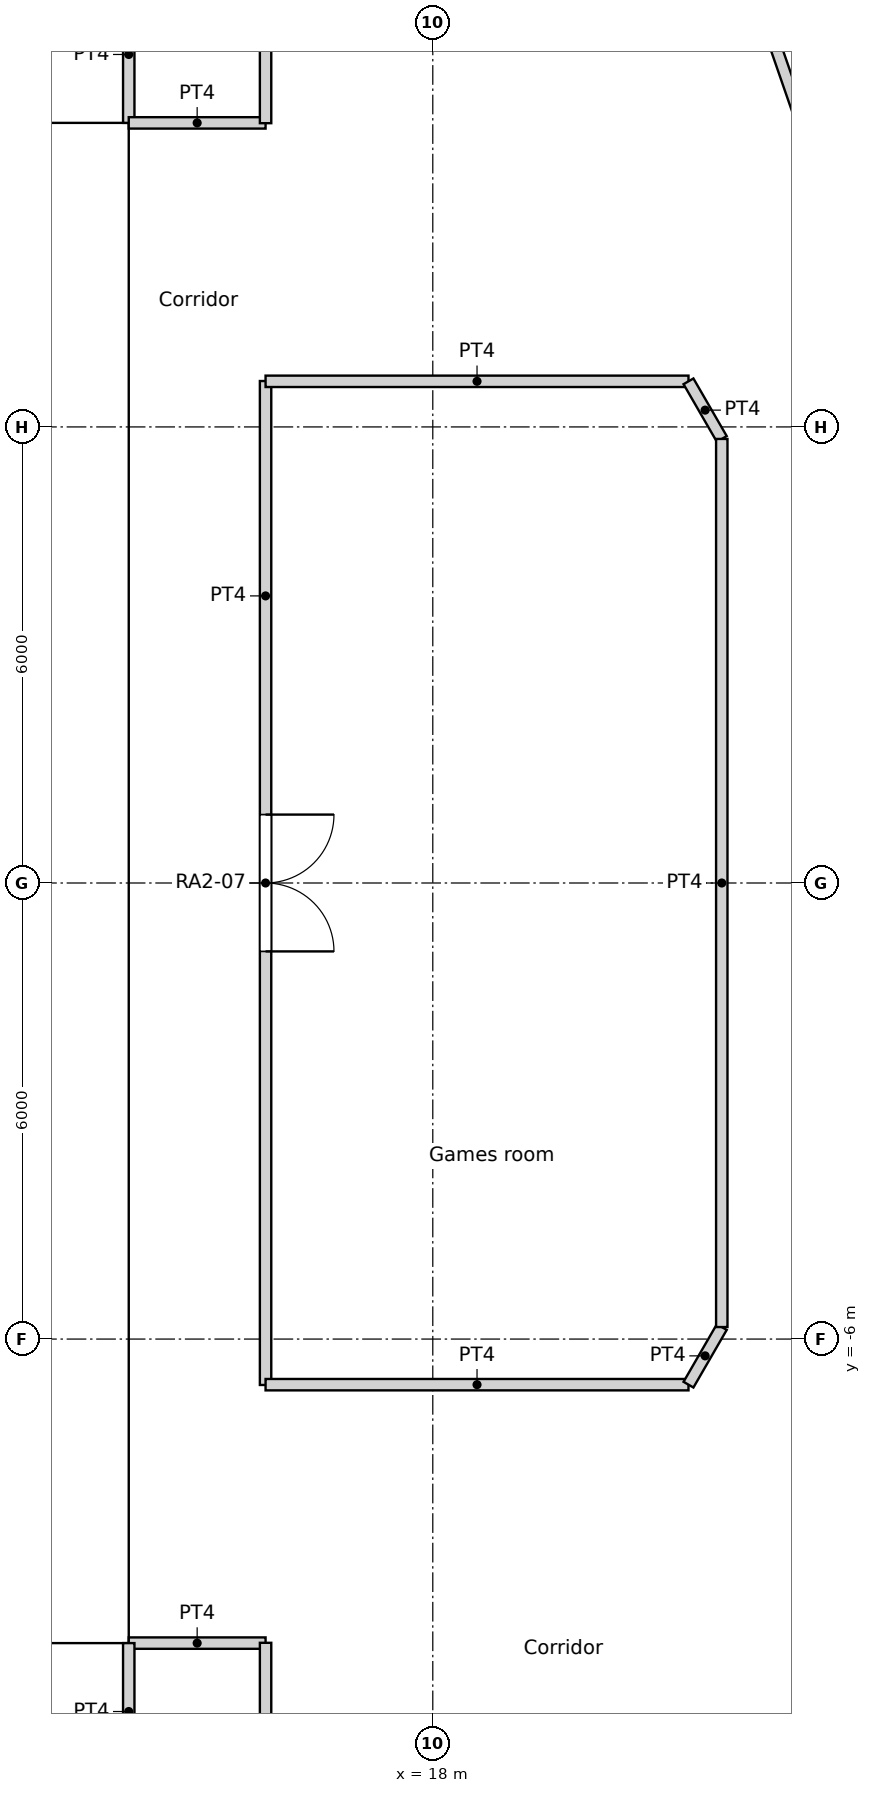
"""IFC4 building model, lengths in metres.
Left out: names, types, materials, properties, quantities, classifications, styles, units other than length and angle.
Written with IfcOpenShell. Run it as: python <this file> out.ifc"""

import sys

from ifc_helpers import new_model, si_unit, direction, frame, frame_2d, origin, origin_2d, place, context, subcontext, project, spatial, rectangle, circle, extrude, element, fill, save


model = new_model("IFC4")
c1 = context("Model", 3, precision=1e-05, world=origin(), true_north=direction((0.0, 1.0)))
c2 = subcontext(c1, "Body", "Model", "MODEL_VIEW")
j1 = project(units=[si_unit("LENGTHUNIT", "METRE"), si_unit("PLANEANGLEUNIT", "RADIAN")], contexts=[c1])
p1 = place(None, origin())
s1 = spatial("IfcSite", under=j1, at=p1, CompositionType="ELEMENT")
p2 = place(p1, origin())
s2 = spatial("IfcBuilding", under=s1, at=p2, CompositionType="ELEMENT")
p3 = place(p2, frame((0.0, 0.0, 39.0)))
s3 = spatial("IfcBuildingStorey", under=s2, at=p3, CompositionType="ELEMENT", Elevation=39.0)
for number, where, z_axis, x_axis in (
    (1, (21.937, 11.017, 0.0), (0.0, 0.0, 1.0), (1.0, 0.0, 0.0)),
    (2, (21.937, -11.017, 0.0), (0.0, 0.0, 1.0), (1.0, 0.0, 0.0)),
):
    element("IfcColumn", number, at=place(p3, frame(where, z_axis=z_axis, x_axis=x_axis)), inside=s3, PredefinedType="COLUMN", context=c2, shape_type="SweptSolid", body=[
        extrude(circle(Radius=0.75, at=origin_2d()), origin(), (0.0, 0.0, 1.0), 3.6),
    ])
for number, where, z_axis, x_axis in (
    (3, (18.822, 0.0, 0.0), (0.0, 0.0, 1.0), (1.0, 0.0, 0.0)),
    (4, (17.986, 5.548, 0.0), (0.0, 0.0, 1.0), (1.0, 0.0, 0.0)),
    (5, (15.552, 10.603, 0.0), (0.0, 0.0, 1.0), (1.0, 0.0, 0.0)),
    (6, (15.552, -10.603, 0.0), (0.0, 0.0, 1.0), (1.0, 0.0, 0.0)),
    (7, (17.986, -5.548, 0.0), (0.0, 0.0, 1.0), (1.0, 0.0, 0.0)),
):
    element("IfcColumn", number, at=place(p3, frame(where, z_axis=z_axis, x_axis=x_axis)), inside=s3, PredefinedType="COLUMN", context=c2, shape_type="SweptSolid", body=[
        extrude(circle(Radius=0.8, at=origin_2d()), origin(), (0.0, 0.0, 1.0), 3.6),
    ])
p4 = place(p3, frame((-14.0, -9.4, 0.0), z_axis=(0.0, 0.0, 1.0), x_axis=(1.0, 0.0, 0.0)))
e8 = element("IfcWall", 8, at=p4, inside=s3, PredefinedType="SOLIDWALL", context=c2, shape_type="SweptSolid", body=[
    extrude(rectangle(XDim=28.0, YDim=1.2, at=frame_2d((14.0, 0.0))), origin(), (0.0, 0.0, 1.0), 3.6),
])
p5 = place(p4, frame((14.9, 0.0, 0.0)))
e9 = element("IfcOpeningElement", 9, at=p5, cuts=e8, PredefinedType="OPENING", context=c2, shape_type="SweptSolid", body=[
    extrude(rectangle(XDim=1.0, YDim=2.1, at=frame_2d((0.5, 1.05))), frame((0.0, 0.6, 0.0), z_axis=(0.0, -1.0, 0.0), x_axis=(1.0, 0.0, 0.0)), (0.0, 0.0, 1.0), 1.2),
])
p6 = place(p4, frame((9.8, 0.0, 0.0)))
e10 = element("IfcOpeningElement", 10, at=p6, cuts=e8, PredefinedType="OPENING", context=c2, shape_type="SweptSolid", body=[
    extrude(rectangle(XDim=1.8, YDim=2.1, at=frame_2d((0.9, 1.05))), frame((0.0, 0.6, 0.0), z_axis=(0.0, -1.0, 0.0), x_axis=(1.0, 0.0, 0.0)), (0.0, 0.0, 1.0), 1.2),
])
p7 = place(p4, frame((16.4, 0.0, 0.0)))
e11 = element("IfcOpeningElement", 11, at=p7, cuts=e8, PredefinedType="OPENING", context=c2, shape_type="SweptSolid", body=[
    extrude(rectangle(XDim=1.8, YDim=2.1, at=frame_2d((0.9, 1.05))), frame((0.0, 0.6, 0.0), z_axis=(0.0, -1.0, 0.0), x_axis=(1.0, 0.0, 0.0)), (0.0, 0.0, 1.0), 1.2),
])
p8 = place(p3, frame((-14.0, 9.4, 0.0), z_axis=(0.0, 0.0, 1.0), x_axis=(1.0, 0.0, 0.0)))
e12 = element("IfcWall", 12, at=p8, inside=s3, PredefinedType="SOLIDWALL", context=c2, shape_type="SweptSolid", body=[
    extrude(rectangle(XDim=28.0, YDim=1.2, at=frame_2d((14.0, 0.0))), origin(), (0.0, 0.0, 1.0), 3.6),
])
p9 = place(p8, frame((9.8, 0.0, 0.0)))
e13 = element("IfcOpeningElement", 13, at=p9, cuts=e12, PredefinedType="OPENING", context=c2, shape_type="SweptSolid", body=[
    extrude(rectangle(XDim=1.8, YDim=2.1, at=frame_2d((0.9, 1.05))), frame((0.0, 0.6, 0.0), z_axis=(0.0, -1.0, 0.0), x_axis=(1.0, 0.0, 0.0)), (0.0, 0.0, 1.0), 1.2),
])
p10 = place(p3, frame((13.4, -8.8, 0.0), z_axis=(0.0, 0.0, 1.0), x_axis=(0.0, 1.0, 0.0)))
e14 = element("IfcWall", 14, at=p10, inside=s3, PredefinedType="SOLIDWALL", context=c2, shape_type="SweptSolid", body=[
    extrude(rectangle(XDim=17.6, YDim=1.2, at=frame_2d((8.8, 0.0))), origin(), (0.0, 0.0, 1.0), 3.6),
])
p11 = place(p10, frame((6.3, 0.0, 0.0)))
e15 = element("IfcOpeningElement", 15, at=p11, cuts=e14, PredefinedType="OPENING", context=c2, shape_type="SweptSolid", body=[
    extrude(rectangle(XDim=1.0, YDim=2.1, at=frame_2d((0.5, 1.05))), frame((0.0, 0.6, 0.0), z_axis=(0.0, -1.0, 0.0), x_axis=(1.0, 0.0, 0.0)), (0.0, 0.0, 1.0), 1.2),
])
for number, where, z_axis, x_axis in (
    (16, (14.0, 10.0, 0.0), (0.0, 0.0, 1.0), (0.0, 1.0, 0.0)),
    (17, (14.0, -11.8, 0.0), (0.0, 0.0, 1.0), (0.0, 1.0, 0.0)),
    (18, (14.0, 10.0, 0.0), (0.0, 0.0, 1.0), (1.0, 0.0, 0.0)),
    (19, (14.0, -10.0, 0.0), (0.0, 0.0, 1.0), (1.0, 0.0, 0.0)),
):
    element("IfcWall", number, at=place(p3, frame(where, z_axis=z_axis, x_axis=x_axis)), inside=s3, PredefinedType="PARTITIONING", context=c2, shape_type="SweptSolid", body=[
        extrude(rectangle(XDim=1.8, YDim=0.15, at=frame_2d((0.9, 0.0))), origin(), (0.0, 0.0, 1.0), 3.15),
    ])
p12 = place(p3, frame((15.8, -6.604, 0.0), z_axis=(0.0, 0.0, 1.0), x_axis=(0.0, 1.0, 0.0)))
e20 = element("IfcWall", 20, at=p12, inside=s3, PredefinedType="PARTITIONING", context=c2, shape_type="SweptSolid", body=[
    extrude(rectangle(XDim=13.208, YDim=0.15, at=frame_2d((6.604, 0.0))), origin(), (0.0, 0.0, 1.0), 3.15),
])
p13 = place(p12, frame((5.704, 0.0, 0.0)))
e21 = element("IfcOpeningElement", 21, at=p13, cuts=e20, PredefinedType="OPENING", context=c2, shape_type="SweptSolid", body=[
    extrude(rectangle(XDim=1.8, YDim=2.1, at=frame_2d((0.9, 1.05))), frame((0.0, 0.075, 0.0), z_axis=(0.0, -1.0, 0.0), x_axis=(1.0, 0.0, 0.0)), (0.0, 0.0, 1.0), 0.15),
])
for number, where, z_axis, x_axis in (
    (22, (15.8, 9.996, 0.0), (0.0, 0.0, 1.0), (0.0, 1.0, 0.0)),
    (23, (15.8, -16.053, 0.0), (0.0, 0.0, 1.0), (0.0, 1.0, 0.0)),
):
    element("IfcWall", number, at=place(p3, frame(where, z_axis=z_axis, x_axis=x_axis)), inside=s3, PredefinedType="PARTITIONING", context=c2, shape_type="SweptSolid", body=[
        extrude(rectangle(XDim=6.057, YDim=0.15, at=frame_2d((3.028, 0.0))), origin(), (0.0, 0.0, 1.0), 3.15),
    ])
p14 = place(p3, frame((15.8, -6.6, 0.0), z_axis=(0.0, 0.0, 1.0), x_axis=(1.0, 0.0, 0.0)))
e24 = element("IfcWall", 24, at=p14, inside=s3, PredefinedType="PARTITIONING", context=c2, shape_type="SweptSolid", body=[
    extrude(rectangle(XDim=5.564, YDim=0.15, at=frame_2d((2.782, 0.0))), origin(), (0.0, 0.0, 1.0), 3.15),
])
p15 = place(p3, frame((21.364, -6.6, 0.0), z_axis=(0.0, 0.0, 1.0), x_axis=(0.500277597875, 0.865865073245, 0.0)))
e25 = element("IfcWall", 25, at=p15, inside=s3, PredefinedType="PARTITIONING", context=c2, shape_type="SweptSolid", body=[
    extrude(rectangle(XDim=0.875, YDim=0.15, at=frame_2d((0.438, 0.0))), origin(), (0.0, 0.0, 1.0), 3.15),
])
p16 = place(p3, frame((21.802, -5.842, 0.0), z_axis=(0.0, 0.0, 1.0), x_axis=(0.0, 1.0, 0.0)))
e26 = element("IfcWall", 26, at=p16, inside=s3, PredefinedType="PARTITIONING", context=c2, shape_type="SweptSolid", body=[
    extrude(rectangle(XDim=11.684, YDim=0.15, at=frame_2d((5.842, 0.0))), origin(), (0.0, 0.0, 1.0), 3.15),
])
p17 = place(p3, frame((21.364, 6.6, 0.0), z_axis=(0.0, 0.0, 1.0), x_axis=(0.500277597875, -0.865865073245, 0.0)))
e27 = element("IfcWall", 27, at=p17, inside=s3, PredefinedType="PARTITIONING", context=c2, shape_type="SweptSolid", body=[
    extrude(rectangle(XDim=0.875, YDim=0.15, at=frame_2d((0.438, 0.0))), origin(), (0.0, 0.0, 1.0), 3.15),
])
p18 = place(p3, frame((15.8, 6.6, 0.0), z_axis=(0.0, 0.0, 1.0), x_axis=(1.0, 0.0, 0.0)))
e28 = element("IfcWall", 28, at=p18, inside=s3, PredefinedType="PARTITIONING", context=c2, shape_type="SweptSolid", body=[
    extrude(rectangle(XDim=5.564, YDim=0.15, at=frame_2d((2.782, 0.0))), origin(), (0.0, 0.0, 1.0), 3.15),
])
p19 = place(p3, frame((20.689, 16.269, 0.0), z_axis=(0.0, 0.0, 1.0), x_axis=(0.327000485361, -0.945024170365, 0.0)))
e29 = element("IfcWall", 29, at=p19, inside=s3, PredefinedType="PARTITIONING", context=c2, shape_type="SweptSolid", body=[
    extrude(rectangle(XDim=17.216, YDim=0.15, at=frame_2d((8.608, 0.0))), origin(), (0.0, 0.0, 1.0), 3.15),
])
p20 = place(p19, frame((12.47, 0.0, 0.0)))
e30 = element("IfcOpeningElement", 30, at=p20, cuts=e29, PredefinedType="OPENING", context=c2, shape_type="SweptSolid", body=[
    extrude(rectangle(XDim=1.1, YDim=2.1, at=frame_2d((0.55, 1.05))), frame((0.0, 0.075, 0.0), z_axis=(0.0, -1.0, 0.0), x_axis=(1.0, 0.0, 0.0)), (0.0, 0.0, 1.0), 0.15),
])
p21 = place(p19, frame((1.148, 0.0, 0.0)))
e31 = element("IfcOpeningElement", 31, at=p21, cuts=e29, PredefinedType="OPENING", context=c2, shape_type="SweptSolid", body=[
    extrude(rectangle(XDim=1.1, YDim=2.1, at=frame_2d((0.55, 1.05))), frame((0.0, 0.075, 0.0), z_axis=(0.0, -1.0, 0.0), x_axis=(1.0, 0.0, 0.0)), (0.0, 0.0, 1.0), 0.15),
])
p22 = place(p3, frame((22.141, -14.229, 0.0), z_axis=(0.0, 0.0, 1.0), x_axis=(0.281730446162, 0.959493593363, 0.0)))
e32 = element("IfcWall", 32, at=p22, inside=s3, PredefinedType="PARTITIONING", context=c2, shape_type="SweptSolid", body=[
    extrude(rectangle(XDim=14.83, YDim=0.15, at=frame_2d((7.415, 0.0))), origin(), (0.0, 0.0, 1.0), 3.15),
])
p23 = place(p22, frame((6.515, 0.0, 0.0)))
e33 = element("IfcOpeningElement", 33, at=p23, cuts=e32, PredefinedType="OPENING", context=c2, shape_type="SweptSolid", body=[
    extrude(rectangle(XDim=1.0, YDim=2.04, at=frame_2d((0.5, 1.02))), frame((0.0, 0.075, 0.0), z_axis=(0.0, -1.0, 0.0), x_axis=(1.0, 0.0, 0.0)), (0.0, 0.0, 1.0), 0.15),
])
p24 = place(p11, origin())
e34 = element("IfcDoor", 34, at=p24, inside=s3, OperationType="DOUBLE_DOOR_SINGLE_SWING", PredefinedType="DOOR", context=c2, shape_type="SweptSolid", body=[
    extrude(rectangle(XDim=1.0, YDim=2.1, at=frame_2d((0.5, 1.05))), frame((0.0, 0.025, 0.0), z_axis=(0.0, -1.0, 0.0), x_axis=(1.0, 0.0, 0.0)), (0.0, 0.0, 1.0), 0.05),
])
fill(e15, e34)
p25 = place(p13, origin())
e35 = element("IfcDoor", 35, at=p25, inside=s3, OperationType="DOUBLE_DOOR_SINGLE_SWING", PredefinedType="DOOR", context=c2, shape_type="SweptSolid", body=[
    extrude(rectangle(XDim=1.8, YDim=2.1, at=frame_2d((0.9, 1.05))), frame((0.0, 0.025, 0.0), z_axis=(0.0, -1.0, 0.0), x_axis=(1.0, 0.0, 0.0)), (0.0, 0.0, 1.0), 0.05),
])
fill(e21, e35)
save(model, sys.argv[1])
